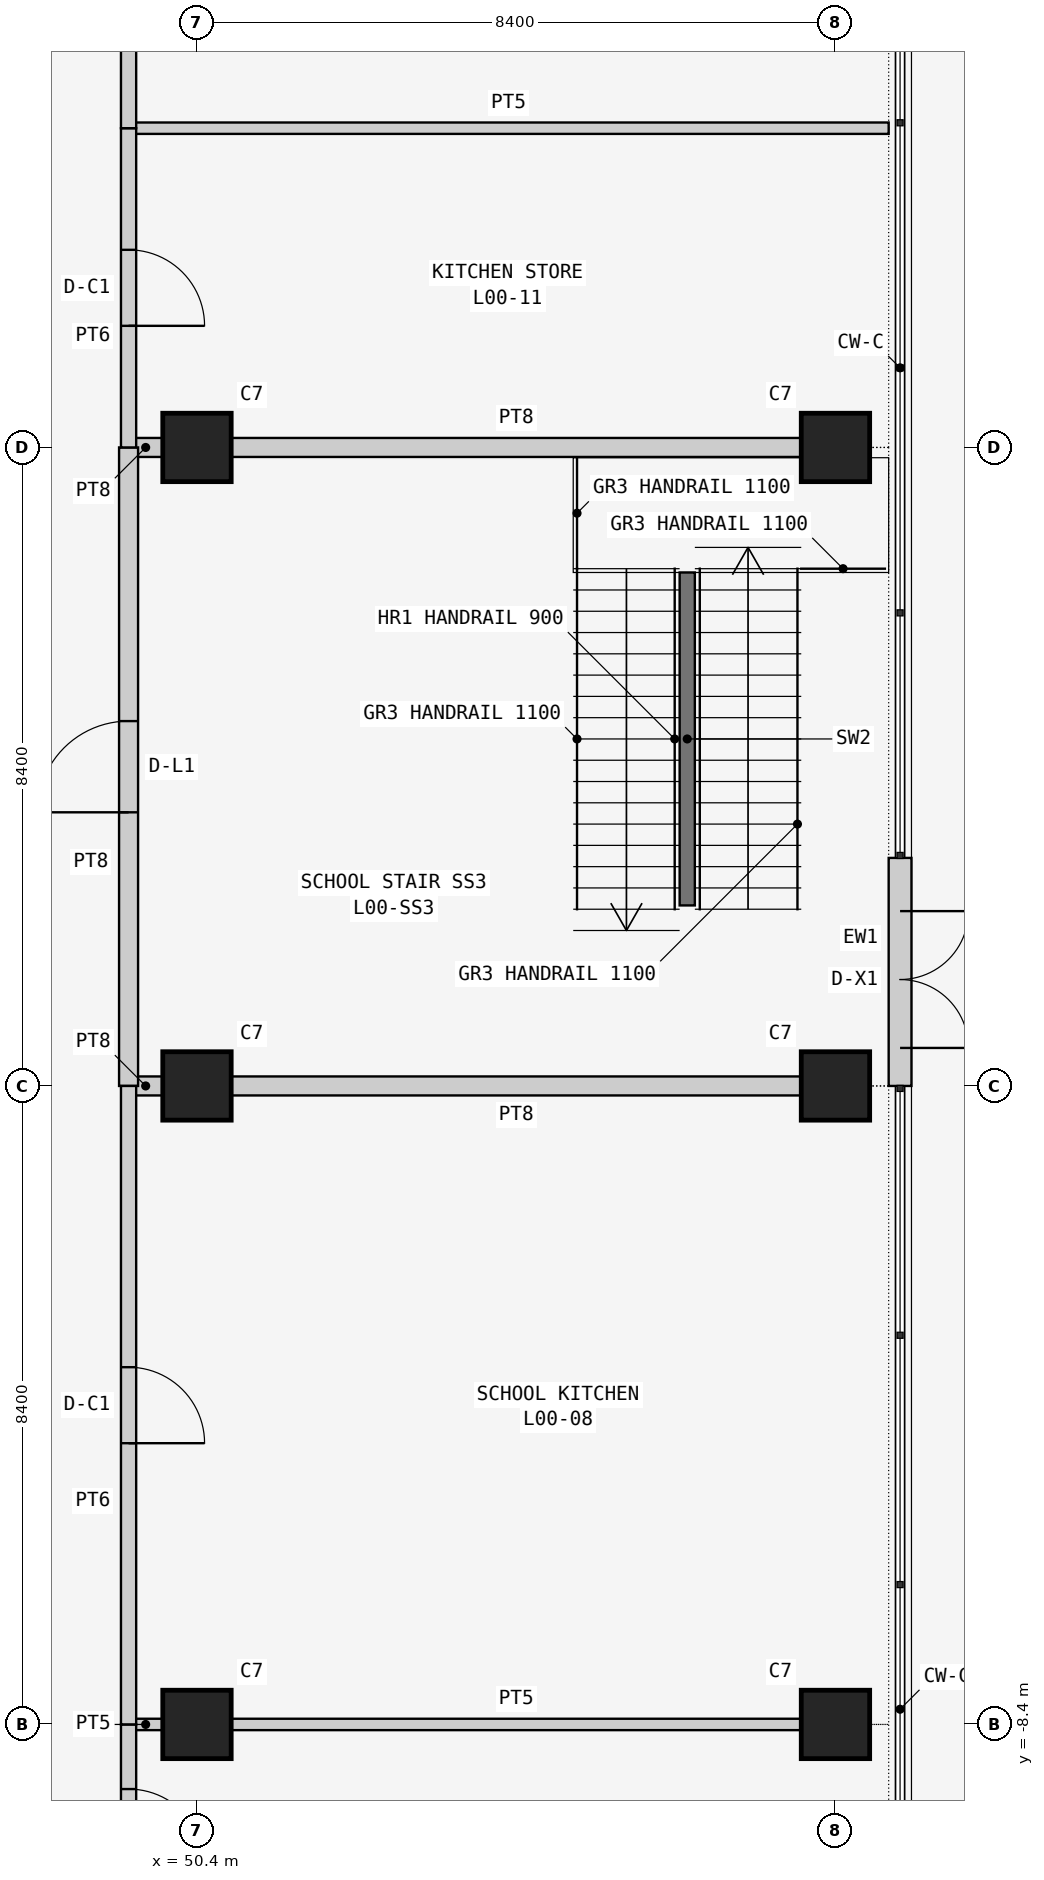
"""IFC4 building model, lengths in metres.
Left out: names, types, materials, properties, quantities, classifications, styles, units other than length and angle.
Written with IfcOpenShell. Run it as: python <this file> out.ifc"""

import sys

from ifc_helpers import new_model, si_unit, direction, frame, frame_2d, origin, origin_2d, place, context, subcontext, project, spatial, rectangle, extrude, element, fill, save


model = new_model("IFC4")
c1 = context("Model", 3, precision=1e-05, world=origin(), true_north=direction((0.0, 1.0)))
c2 = subcontext(c1, "Body", "Model", "MODEL_VIEW")
j1 = project(units=[si_unit("LENGTHUNIT", "METRE"), si_unit("PLANEANGLEUNIT", "RADIAN")], contexts=[c1])
p1 = place(None, origin())
s1 = spatial("IfcSite", under=j1, at=p1, CompositionType="ELEMENT")
p2 = place(p1, origin())
s2 = spatial("IfcBuilding", under=s1, at=p2, CompositionType="ELEMENT")
p3 = place(p2, origin())
s3 = spatial("IfcBuildingStorey", under=s2, at=p3, CompositionType="ELEMENT", Elevation=0.0)
for number, where, z_axis, x_axis in (
    (1, (50.4, -8.4, 0.0), (0.0, 0.0, 1.0), (1.0, 0.0, 0.0)),
    (2, (50.4, 0.0, 0.0), (0.0, 0.0, 1.0), (1.0, 0.0, 0.0)),
    (3, (50.4, 8.4, 0.0), (0.0, 0.0, 1.0), (1.0, 0.0, 0.0)),
    (4, (58.8, -8.4, 0.0), (0.0, 0.0, 1.0), (1.0, 0.0, 0.0)),
    (5, (58.8, 0.0, 0.0), (0.0, 0.0, 1.0), (1.0, 0.0, 0.0)),
    (6, (58.8, 8.4, 0.0), (0.0, 0.0, 1.0), (1.0, 0.0, 0.0)),
):
    element("IfcColumn", number, at=place(p3, frame(where, z_axis=z_axis, x_axis=x_axis)), inside=s3, PredefinedType="COLUMN", context=c2, shape_type="SweptSolid", body=[
        extrude(rectangle(XDim=0.9, YDim=0.9, at=origin_2d()), origin(), (0.0, 0.0, 1.0), 6.0),
    ])
p4 = place(p3, frame((59.65, 0.0, 0.0), z_axis=(0.0, 0.0, 1.0), x_axis=(0.0, 1.0, 0.0)))
e7 = element("IfcWall", 7, at=p4, inside=s3, PredefinedType="SOLIDWALL", context=c2, shape_type="SweptSolid", body=[
    extrude(rectangle(XDim=3.0, YDim=0.3, at=frame_2d((1.5, 0.0))), origin(), (0.0, 0.0, 1.0), 5.8),
])
p5 = place(p4, frame((0.5, 0.0, 0.0)))
e8 = element("IfcOpeningElement", 8, at=p5, cuts=e7, PredefinedType="OPENING", context=c2, shape_type="SweptSolid", body=[
    extrude(rectangle(XDim=1.8, YDim=2.4, at=frame_2d((0.9, 1.2))), frame((0.0, 0.16, 0.0), z_axis=(0.0, -1.0, 0.0), x_axis=(1.0, 0.0, 0.0)), (0.0, 0.0, 1.0), 0.32),
])
p6 = place(p3, frame((49.95, 0.0, 0.0), z_axis=(0.0, 0.0, 1.0), x_axis=(-1.0, 0.0, 0.0)))
e9 = element("IfcWall", 9, at=p6, inside=s3, PredefinedType="SOLIDWALL", context=c2, shape_type="SweptSolid", body=[
    extrude(rectangle(XDim=0.45, YDim=0.25, at=frame_2d((0.225, 0.0))), origin(), (0.0, 0.0, 1.0), 5.043),
])
p7 = place(p3, frame((58.35, 0.0, 0.0), z_axis=(0.0, 0.0, 1.0), x_axis=(-1.0, 0.0, 0.0)))
e10 = element("IfcWall", 10, at=p7, inside=s3, PredefinedType="SOLIDWALL", context=c2, shape_type="SweptSolid", body=[
    extrude(rectangle(XDim=7.5, YDim=0.25, at=frame_2d((3.75, 0.0))), origin(), (0.0, 0.0, 1.0), 5.043),
])
p8 = place(p3, frame((49.5, 8.4, 0.0), z_axis=(0.0, 0.0, 1.0), x_axis=(1.0, 0.0, 0.0)))
e11 = element("IfcWall", 11, at=p8, inside=s3, PredefinedType="SOLIDWALL", context=c2, shape_type="SweptSolid", body=[
    extrude(rectangle(XDim=0.45, YDim=0.25, at=frame_2d((0.225, 0.0))), origin(), (0.0, 0.0, 1.0), 5.043),
])
p9 = place(p3, frame((50.85, 8.4, 0.0), z_axis=(0.0, 0.0, 1.0), x_axis=(1.0, 0.0, 0.0)))
e12 = element("IfcWall", 12, at=p9, inside=s3, PredefinedType="SOLIDWALL", context=c2, shape_type="SweptSolid", body=[
    extrude(rectangle(XDim=7.5, YDim=0.25, at=frame_2d((3.75, 0.0))), origin(), (0.0, 0.0, 1.0), 5.043),
])
p10 = place(p3, frame((49.5, 0.0, 0.0), z_axis=(0.0, 0.0, 1.0), x_axis=(0.0, 1.0, 0.0)))
e13 = element("IfcWall", 13, at=p10, inside=s3, PredefinedType="SOLIDWALL", context=c2, shape_type="SweptSolid", body=[
    extrude(rectangle(XDim=8.4, YDim=0.25, at=frame_2d((4.2, 0.0))), origin(), (0.0, 0.0, 1.0), 5.8),
])
p11 = place(p10, frame((3.6, 0.0, 0.0)))
e14 = element("IfcOpeningElement", 14, at=p11, cuts=e13, PredefinedType="OPENING", context=c2, shape_type="SweptSolid", body=[
    extrude(rectangle(XDim=1.2, YDim=2.1, at=frame_2d((0.6, 1.05))), frame((0.0, 0.135, 0.0), z_axis=(0.0, -1.0, 0.0), x_axis=(1.0, 0.0, 0.0)), (0.0, 0.0, 1.0), 0.27),
])
p12 = place(p3, frame((49.5, -8.4, 0.0), z_axis=(0.0, 0.0, 1.0), x_axis=(1.0, 0.0, 0.0)))
e15 = element("IfcWall", 15, at=p12, inside=s3, PredefinedType="PARTITIONING", context=c2, shape_type="SweptSolid", body=[
    extrude(rectangle(XDim=0.45, YDim=0.15, at=frame_2d((0.225, 0.0))), origin(), (0.0, 0.0, 1.0), 5.043),
])
p13 = place(p3, frame((50.85, -8.4, 0.0), z_axis=(0.0, 0.0, 1.0), x_axis=(1.0, 0.0, 0.0)))
e16 = element("IfcWall", 16, at=p13, inside=s3, PredefinedType="PARTITIONING", context=c2, shape_type="SweptSolid", body=[
    extrude(rectangle(XDim=7.5, YDim=0.15, at=frame_2d((3.75, 0.0))), origin(), (0.0, 0.0, 1.0), 5.043),
])
p14 = place(p3, frame((49.5, -11.1, 0.0), z_axis=(0.0, 0.0, 1.0), x_axis=(0.0, 1.0, 0.0)))
e17 = element("IfcWall", 17, at=p14, inside=s3, PredefinedType="PARTITIONING", context=c2, shape_type="SweptSolid", body=[
    extrude(rectangle(XDim=2.7, YDim=0.2, at=frame_2d((1.35, 0.0))), origin(), (0.0, 0.0, 1.0), 5.8),
])
p15 = place(p14, frame((0.85, 0.0, 0.0)))
e18 = element("IfcOpeningElement", 18, at=p15, cuts=e17, PredefinedType="OPENING", context=c2, shape_type="SweptSolid", body=[
    extrude(rectangle(XDim=1.0, YDim=2.1, at=frame_2d((0.5, 1.05))), frame((0.0, 0.11, 0.0), z_axis=(0.0, -1.0, 0.0), x_axis=(1.0, 0.0, 0.0)), (0.0, 0.0, 1.0), 0.22),
])
p16 = place(p3, frame((49.5, -8.4, 0.0), z_axis=(0.0, 0.0, 1.0), x_axis=(0.0, 1.0, 0.0)))
e19 = element("IfcWall", 19, at=p16, inside=s3, PredefinedType="PARTITIONING", context=c2, shape_type="SweptSolid", body=[
    extrude(rectangle(XDim=8.4, YDim=0.2, at=frame_2d((4.2, 0.0))), origin(), (0.0, 0.0, 1.0), 5.8),
])
p17 = place(p16, frame((3.7, 0.0, 0.0)))
e20 = element("IfcOpeningElement", 20, at=p17, cuts=e19, PredefinedType="OPENING", context=c2, shape_type="SweptSolid", body=[
    extrude(rectangle(XDim=1.0, YDim=2.1, at=frame_2d((0.5, 1.05))), frame((0.0, 0.11, 0.0), z_axis=(0.0, -1.0, 0.0), x_axis=(1.0, 0.0, 0.0)), (0.0, 0.0, 1.0), 0.22),
])
p18 = place(p3, frame((49.5, 12.6, 0.0), z_axis=(0.0, 0.0, 1.0), x_axis=(1.0, 0.0, 0.0)))
e21 = element("IfcWall", 21, at=p18, inside=s3, PredefinedType="PARTITIONING", context=c2, shape_type="SweptSolid", body=[
    extrude(rectangle(XDim=10.0, YDim=0.15, at=frame_2d((5.0, 0.0))), origin(), (0.0, 0.0, 1.0), 5.8),
])
p19 = place(p3, frame((49.5, 8.4, 0.0), z_axis=(0.0, 0.0, 1.0), x_axis=(0.0, 1.0, 0.0)))
e22 = element("IfcWall", 22, at=p19, inside=s3, PredefinedType="PARTITIONING", context=c2, shape_type="SweptSolid", body=[
    extrude(rectangle(XDim=4.2, YDim=0.2, at=frame_2d((2.1, 0.0))), origin(), (0.0, 0.0, 1.0), 5.8),
])
p20 = place(p19, frame((1.6, 0.0, 0.0)))
e23 = element("IfcOpeningElement", 23, at=p20, cuts=e22, PredefinedType="OPENING", context=c2, shape_type="SweptSolid", body=[
    extrude(rectangle(XDim=1.0, YDim=2.1, at=frame_2d((0.5, 1.05))), frame((0.0, 0.11, 0.0), z_axis=(0.0, -1.0, 0.0), x_axis=(1.0, 0.0, 0.0)), (0.0, 0.0, 1.0), 0.22),
])
p21 = place(p3, frame((49.5, 12.6, 0.0), z_axis=(0.0, 0.0, 1.0), x_axis=(0.0, 1.0, 0.0)))
e24 = element("IfcWall", 24, at=p21, inside=s3, PredefinedType="PARTITIONING", context=c2, shape_type="SweptSolid", body=[
    extrude(rectangle(XDim=3.3, YDim=0.2, at=frame_2d((1.65, 0.0))), origin(), (0.0, 0.0, 1.0), 5.8),
])
p22 = place(p21, frame((1.15, 0.0, 0.0)))
e25 = element("IfcOpeningElement", 25, at=p22, cuts=e24, PredefinedType="OPENING", context=c2, shape_type="SweptSolid", body=[
    extrude(rectangle(XDim=1.0, YDim=2.1, at=frame_2d((0.5, 1.05))), frame((0.0, 0.11, 0.0), z_axis=(0.0, -1.0, 0.0), x_axis=(1.0, 0.0, 0.0)), (0.0, 0.0, 1.0), 0.22),
])
p23 = place(p3, frame((56.85, 2.375, 0.0), z_axis=(0.0, 0.0, 1.0), x_axis=(0.0, 1.0, 0.0)))
e26 = element("IfcWall", 26, at=p23, inside=s3, PredefinedType="SOLIDWALL", context=c2, shape_type="SweptSolid", body=[
    extrude(rectangle(XDim=4.38, YDim=0.2, at=frame_2d((2.19, 0.0))), origin(), (0.0, 0.0, 1.0), 6.0),
])
p24 = place(p5, frame((1.8, 0.0, 0.0), z_axis=(0.0, 0.0, 1.0), x_axis=(-1.0, 0.0, 0.0)))
e27 = element("IfcDoor", 27, at=p24, inside=s3, OperationType="DOUBLE_DOOR_SINGLE_SWING", PredefinedType="DOOR", context=c2, shape_type="SweptSolid", body=[
    extrude(rectangle(XDim=1.8, YDim=2.4, at=frame_2d((0.9, 1.2))), frame((0.0, 0.025, 0.0), z_axis=(0.0, -1.0, 0.0), x_axis=(1.0, 0.0, 0.0)), (0.0, 0.0, 1.0), 0.05),
])
fill(e8, e27)
p25 = place(p11, origin())
e28 = element("IfcDoor", 28, at=p25, inside=s3, OperationType="SINGLE_SWING_LEFT", PredefinedType="DOOR", context=c2, shape_type="SweptSolid", body=[
    extrude(rectangle(XDim=1.2, YDim=2.1, at=frame_2d((0.6, 1.05))), frame((0.0, 0.025, 0.0), z_axis=(0.0, -1.0, 0.0), x_axis=(1.0, 0.0, 0.0)), (0.0, 0.0, 1.0), 0.05),
])
fill(e14, e28)
p26 = place(p15, frame((1.0, 0.0, 0.0), z_axis=(0.0, 0.0, 1.0), x_axis=(-1.0, 0.0, 0.0)))
e29 = element("IfcDoor", 29, at=p26, inside=s3, OperationType="SINGLE_SWING_RIGHT", PredefinedType="DOOR", context=c2, shape_type="SweptSolid", body=[
    extrude(rectangle(XDim=1.0, YDim=2.1, at=frame_2d((0.5, 1.05))), frame((0.0, 0.025, 0.0), z_axis=(0.0, -1.0, 0.0), x_axis=(1.0, 0.0, 0.0)), (0.0, 0.0, 1.0), 0.05),
])
fill(e18, e29)
p27 = place(p17, frame((1.0, 0.0, 0.0), z_axis=(0.0, 0.0, 1.0), x_axis=(-1.0, 0.0, 0.0)))
e30 = element("IfcDoor", 30, at=p27, inside=s3, OperationType="SINGLE_SWING_RIGHT", PredefinedType="DOOR", context=c2, shape_type="SweptSolid", body=[
    extrude(rectangle(XDim=1.0, YDim=2.1, at=frame_2d((0.5, 1.05))), frame((0.0, 0.025, 0.0), z_axis=(0.0, -1.0, 0.0), x_axis=(1.0, 0.0, 0.0)), (0.0, 0.0, 1.0), 0.05),
])
fill(e20, e30)
p28 = place(p20, frame((1.0, 0.0, 0.0), z_axis=(0.0, 0.0, 1.0), x_axis=(-1.0, 0.0, 0.0)))
e31 = element("IfcDoor", 31, at=p28, inside=s3, OperationType="SINGLE_SWING_RIGHT", PredefinedType="DOOR", context=c2, shape_type="SweptSolid", body=[
    extrude(rectangle(XDim=1.0, YDim=2.1, at=frame_2d((0.5, 1.05))), frame((0.0, 0.025, 0.0), z_axis=(0.0, -1.0, 0.0), x_axis=(1.0, 0.0, 0.0)), (0.0, 0.0, 1.0), 0.05),
])
fill(e23, e31)
save(model, sys.argv[1])
